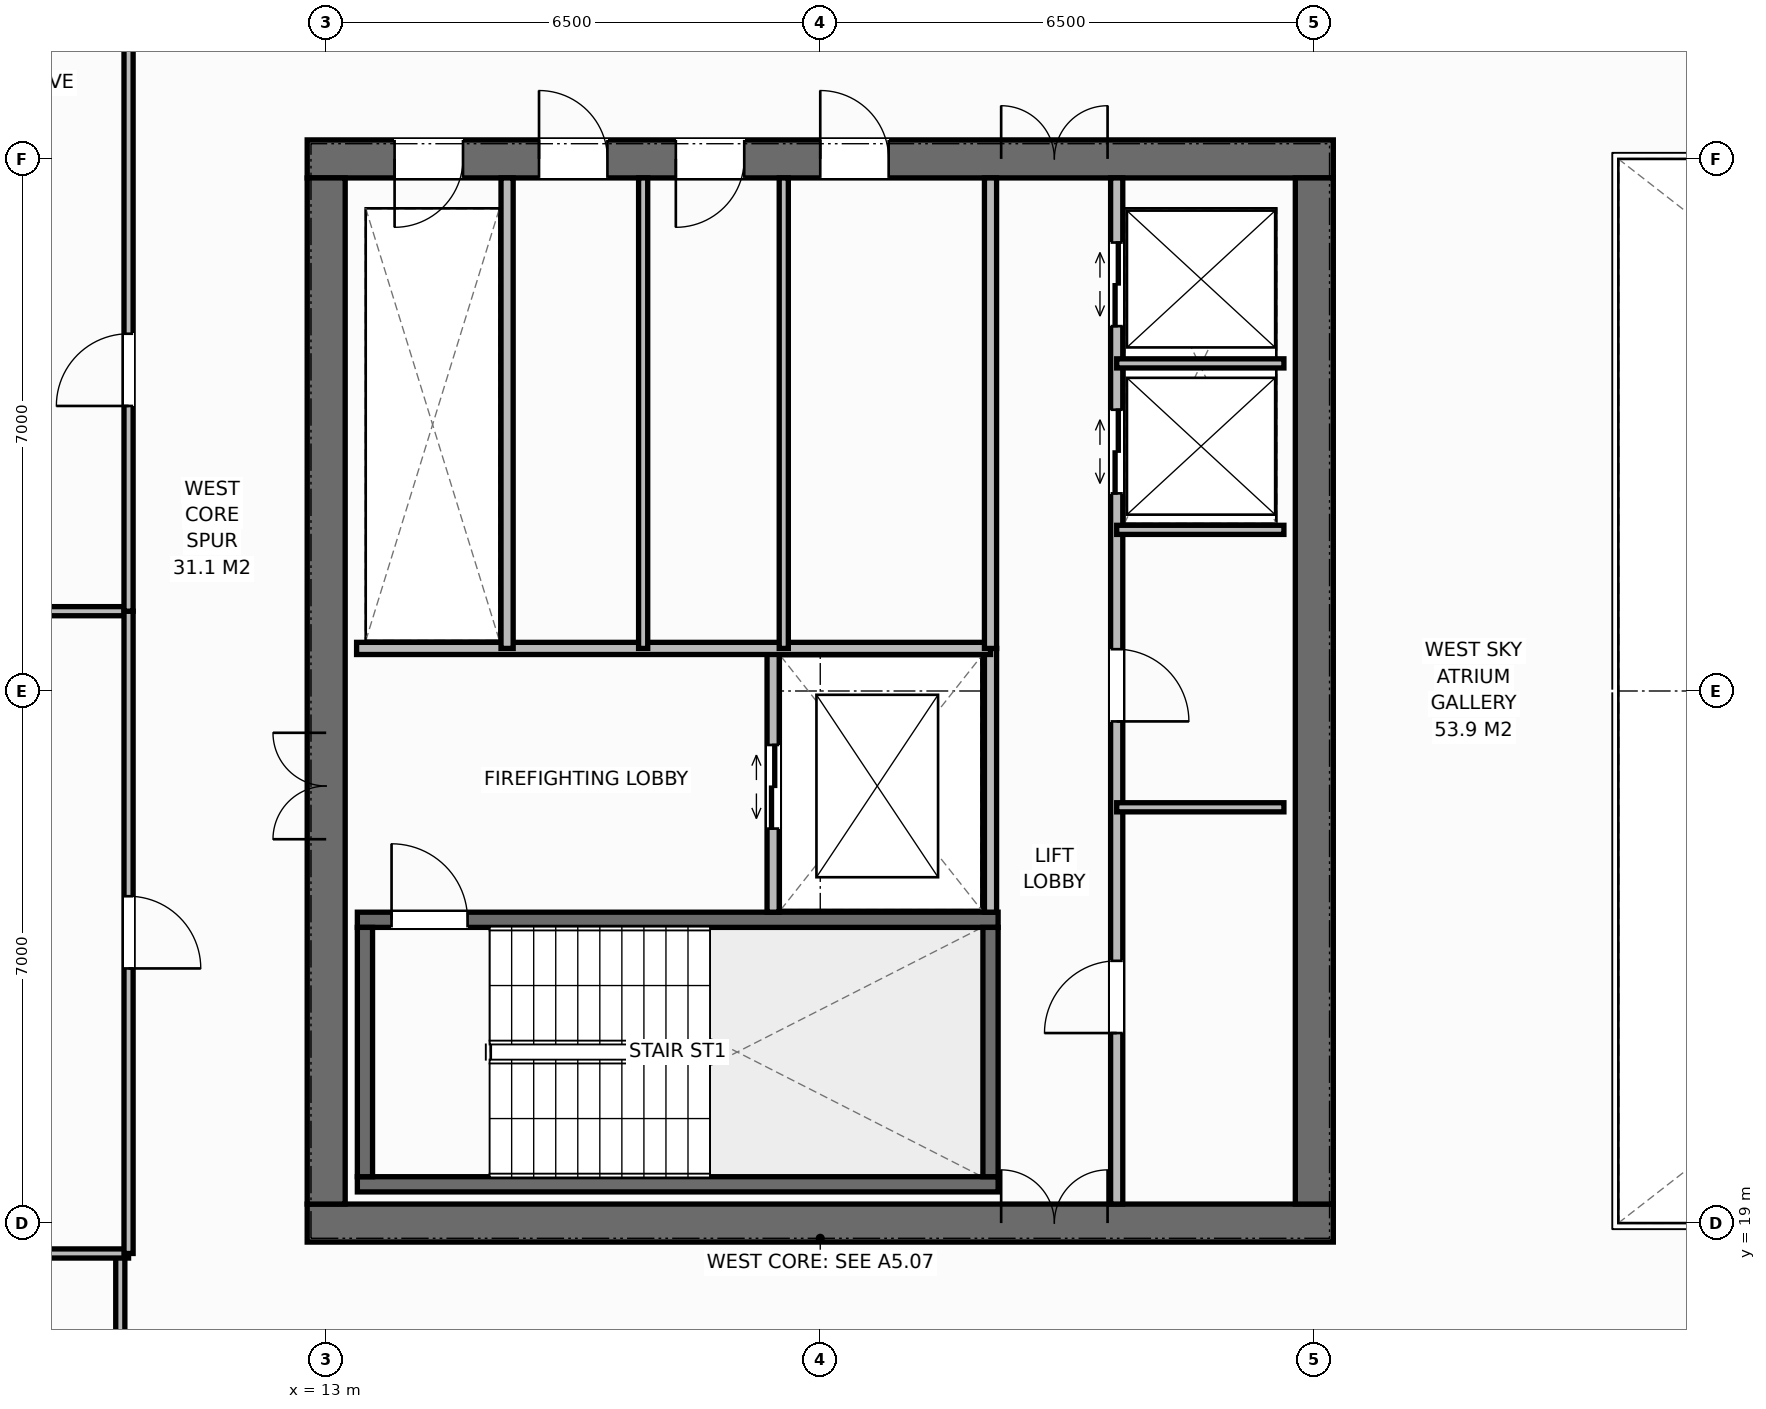
"""IFC4 building model, lengths in metres.
Left out: names, types, materials, properties, quantities, classifications, styles, units other than length and angle.
Written with IfcOpenShell. Run it as: python <this file> out.ifc"""

import sys

from ifc_helpers import new_model, si_unit, direction, frame, frame_2d, origin, place, context, subcontext, project, spatial, rectangle, extrude, element, fill, save


model = new_model("IFC4")
c1 = context("Model", 3, precision=1e-05, world=origin(), true_north=direction((0.0, 1.0)))
c2 = subcontext(c1, "Body", "Model", "MODEL_VIEW")
j1 = project(units=[si_unit("LENGTHUNIT", "METRE"), si_unit("PLANEANGLEUNIT", "RADIAN")], contexts=[c1])
p1 = place(None, origin())
s1 = spatial("IfcSite", under=j1, at=p1, CompositionType="ELEMENT")
p2 = place(p1, origin())
s2 = spatial("IfcBuilding", under=s1, at=p2, CompositionType="ELEMENT")
p3 = place(p2, frame((0.0, 0.0, 217.6)))
s3 = spatial("IfcBuildingStorey", under=s2, at=p3, CompositionType="ELEMENT", Elevation=217.6)
p4 = place(p3, frame((12.75, 19.0, 0.0), z_axis=(0.0, 0.0, 1.0), x_axis=(1.0, 0.0, 0.0)))
e1 = element("IfcWall", 1, at=p4, inside=s3, PredefinedType="SHEAR", context=c2, shape_type="SweptSolid", body=[
    extrude(rectangle(XDim=13.5, YDim=0.5, at=frame_2d((6.75, 0.0))), origin(), (0.0, 0.0, 1.0), 3.8),
])
p5 = place(p4, frame((9.13, 0.0, 0.0)))
e2 = element("IfcOpeningElement", 2, at=p5, cuts=e1, PredefinedType="OPENING", context=c2, shape_type="SweptSolid", body=[
    extrude(rectangle(XDim=1.4, YDim=2.2, at=frame_2d((0.7, 1.1))), frame((0.0, 0.26, 0.0), z_axis=(0.0, -1.0, 0.0), x_axis=(1.0, 0.0, 0.0)), (0.0, 0.0, 1.0), 0.52),
])
p6 = place(p3, frame((12.75, 33.0, 0.0), z_axis=(0.0, 0.0, 1.0), x_axis=(1.0, 0.0, 0.0)))
e3 = element("IfcWall", 3, at=p6, inside=s3, PredefinedType="SHEAR", context=c2, shape_type="SweptSolid", body=[
    extrude(rectangle(XDim=13.5, YDim=0.5, at=frame_2d((6.75, 0.0))), origin(), (0.0, 0.0, 1.0), 3.8),
])
p7 = place(p6, frame((1.15, 0.0, 0.0)))
e4 = element("IfcOpeningElement", 4, at=p7, cuts=e3, PredefinedType="OPENING", context=c2, shape_type="SweptSolid", body=[
    extrude(rectangle(XDim=0.9, YDim=2.15, at=frame_2d((0.45, 1.075))), frame((0.0, 0.26, 0.0), z_axis=(0.0, -1.0, 0.0), x_axis=(1.0, 0.0, 0.0)), (0.0, 0.0, 1.0), 0.52),
])
p8 = place(p6, frame((3.05, 0.0, 0.0)))
e5 = element("IfcOpeningElement", 5, at=p8, cuts=e3, PredefinedType="OPENING", context=c2, shape_type="SweptSolid", body=[
    extrude(rectangle(XDim=0.9, YDim=2.15, at=frame_2d((0.45, 1.075))), frame((0.0, 0.26, 0.0), z_axis=(0.0, -1.0, 0.0), x_axis=(1.0, 0.0, 0.0)), (0.0, 0.0, 1.0), 0.52),
])
p9 = place(p6, frame((4.85, 0.0, 0.0)))
e6 = element("IfcOpeningElement", 6, at=p9, cuts=e3, PredefinedType="OPENING", context=c2, shape_type="SweptSolid", body=[
    extrude(rectangle(XDim=0.9, YDim=2.15, at=frame_2d((0.45, 1.075))), frame((0.0, 0.26, 0.0), z_axis=(0.0, -1.0, 0.0), x_axis=(1.0, 0.0, 0.0)), (0.0, 0.0, 1.0), 0.52),
])
p10 = place(p6, frame((6.75, 0.0, 0.0)))
e7 = element("IfcOpeningElement", 7, at=p10, cuts=e3, PredefinedType="OPENING", context=c2, shape_type="SweptSolid", body=[
    extrude(rectangle(XDim=0.9, YDim=2.15, at=frame_2d((0.45, 1.075))), frame((0.0, 0.26, 0.0), z_axis=(0.0, -1.0, 0.0), x_axis=(1.0, 0.0, 0.0)), (0.0, 0.0, 1.0), 0.52),
])
p11 = place(p6, frame((9.13, 0.0, 0.0)))
e8 = element("IfcOpeningElement", 8, at=p11, cuts=e3, PredefinedType="OPENING", context=c2, shape_type="SweptSolid", body=[
    extrude(rectangle(XDim=1.4, YDim=2.2, at=frame_2d((0.7, 1.1))), frame((0.0, 0.26, 0.0), z_axis=(0.0, -1.0, 0.0), x_axis=(1.0, 0.0, 0.0)), (0.0, 0.0, 1.0), 0.52),
])
p12 = place(p3, frame((13.0, 19.25, 0.0), z_axis=(0.0, 0.0, 1.0), x_axis=(0.0, 1.0, 0.0)))
e9 = element("IfcWall", 9, at=p12, inside=s3, PredefinedType="SHEAR", context=c2, shape_type="SweptSolid", body=[
    extrude(rectangle(XDim=13.5, YDim=0.5, at=frame_2d((6.75, 0.0))), origin(), (0.0, 0.0, 1.0), 3.8),
])
p13 = place(p12, frame((4.8, 0.0, 0.0)))
e10 = element("IfcOpeningElement", 10, at=p13, cuts=e9, PredefinedType="OPENING", context=c2, shape_type="SweptSolid", body=[
    extrude(rectangle(XDim=1.4, YDim=2.2, at=frame_2d((0.7, 1.1))), frame((0.0, 0.26, 0.0), z_axis=(0.0, -1.0, 0.0), x_axis=(1.0, 0.0, 0.0)), (0.0, 0.0, 1.0), 0.52),
])
p14 = place(p3, frame((26.0, 19.25, 0.0), z_axis=(0.0, 0.0, 1.0), x_axis=(0.0, 1.0, 0.0)))
e11 = element("IfcWall", 11, at=p14, inside=s3, PredefinedType="SHEAR", context=c2, shape_type="SweptSolid", body=[
    extrude(rectangle(XDim=13.5, YDim=0.5, at=frame_2d((6.75, 0.0))), origin(), (0.0, 0.0, 1.0), 3.8),
])
p15 = place(p3, frame((13.41, 19.51, 0.0), z_axis=(0.0, 0.0, 1.0), x_axis=(1.0, 0.0, 0.0)))
e12 = element("IfcWall", 12, at=p15, inside=s3, PredefinedType="SHEAR", context=c2, shape_type="SweptSolid", body=[
    extrude(rectangle(XDim=8.43, YDim=0.2, at=frame_2d((4.215, 0.0))), origin(), (0.0, 0.0, 1.0), 3.8),
])
p16 = place(p3, frame((13.41, 22.99, 0.0), z_axis=(0.0, 0.0, 1.0), x_axis=(1.0, 0.0, 0.0)))
e13 = element("IfcWall", 13, at=p16, inside=s3, PredefinedType="SHEAR", context=c2, shape_type="SweptSolid", body=[
    extrude(rectangle(XDim=8.43, YDim=0.2, at=frame_2d((4.215, 0.0))), origin(), (0.0, 0.0, 1.0), 3.8),
])
p17 = place(p16, frame((0.45, 0.0, 0.0)))
e14 = element("IfcOpeningElement", 14, at=p17, cuts=e13, PredefinedType="OPENING", context=c2, shape_type="SweptSolid", body=[
    extrude(rectangle(XDim=1.0, YDim=2.15, at=frame_2d((0.5, 1.075))), frame((0.0, 0.11, 0.0), z_axis=(0.0, -1.0, 0.0), x_axis=(1.0, 0.0, 0.0)), (0.0, 0.0, 1.0), 0.22),
])
for number, where, z_axis, x_axis in (
    (15, (13.51, 19.61, 0.0), (0.0, 0.0, 1.0), (0.0, 1.0, 0.0)),
    (16, (21.74, 19.61, 0.0), (0.0, 0.0, 1.0), (0.0, 1.0, 0.0)),
):
    element("IfcWall", number, at=place(p3, frame(where, z_axis=z_axis, x_axis=x_axis)), inside=s3, PredefinedType="SHEAR", context=c2, shape_type="SweptSolid", body=[
        extrude(rectangle(XDim=3.28, YDim=0.2, at=frame_2d((1.64, 0.0))), origin(), (0.0, 0.0, 1.0), 3.8),
    ])
p18 = place(p3, frame((21.74, 23.09, 0.0), z_axis=(0.0, 0.0, 1.0), x_axis=(0.0, 1.0, 0.0)))
e17 = element("IfcWall", 17, at=p18, inside=s3, PredefinedType="STANDARD", context=c2, shape_type="SweptSolid", body=[
    extrude(rectangle(XDim=3.47, YDim=0.16, at=frame_2d((1.735, 0.0))), origin(), (0.0, 0.0, 1.0), 3.58),
])
p19 = place(p3, frame((18.88, 23.09, 0.0), z_axis=(0.0, 0.0, 1.0), x_axis=(0.0, 1.0, 0.0)))
e18 = element("IfcWall", 18, at=p19, inside=s3, PredefinedType="STANDARD", context=c2, shape_type="SweptSolid", body=[
    extrude(rectangle(XDim=3.47, YDim=0.16, at=frame_2d((1.735, 0.0))), origin(), (0.0, 0.0, 1.0), 3.58),
])
p20 = place(p19, frame((1.1, 0.0, 0.0)))
e19 = element("IfcOpeningElement", 19, at=p20, cuts=e18, PredefinedType="OPENING", context=c2, shape_type="SweptSolid", body=[
    extrude(rectangle(XDim=1.1, YDim=2.2, at=frame_2d((0.55, 1.1))), frame((0.0, 0.09, 0.0), z_axis=(0.0, -1.0, 0.0), x_axis=(1.0, 0.0, 0.0)), (0.0, 0.0, 1.0), 0.18),
])
p21 = place(p3, frame((13.4, 26.56, 0.0), z_axis=(0.0, 0.0, 1.0), x_axis=(1.0, 0.0, 0.0)))
e20 = element("IfcWall", 20, at=p21, inside=s3, PredefinedType="STANDARD", context=c2, shape_type="SweptSolid", body=[
    extrude(rectangle(XDim=8.34, YDim=0.16, at=frame_2d((4.17, 0.0))), origin(), (0.0, 0.0, 1.0), 3.58),
])
p22 = place(p3, frame((15.38, 26.56, 0.0), z_axis=(0.0, 0.0, 1.0), x_axis=(0.0, 1.0, 0.0)))
e21 = element("IfcWall", 21, at=p22, inside=s3, PredefinedType="STANDARD", context=c2, shape_type="SweptSolid", body=[
    extrude(rectangle(XDim=6.19, YDim=0.16, at=frame_2d((3.095, 0.0))), origin(), (0.0, 0.0, 1.0), 3.58),
])
for number, where, z_axis, x_axis in (
    (22, (17.17, 26.56, 0.0), (0.0, 0.0, 1.0), (0.0, 1.0, 0.0)),
    (23, (19.02, 26.56, 0.0), (0.0, 0.0, 1.0), (0.0, 1.0, 0.0)),
):
    element("IfcWall", number, at=place(p3, frame(where, z_axis=z_axis, x_axis=x_axis)), inside=s3, PredefinedType="PARTITIONING", context=c2, shape_type="SweptSolid", body=[
        extrude(rectangle(XDim=6.19, YDim=0.12, at=frame_2d((3.095, 0.0))), origin(), (0.0, 0.0, 1.0), 3.58),
    ])
p23 = place(p3, frame((21.74, 26.56, 0.0), z_axis=(0.0, 0.0, 1.0), x_axis=(0.0, 1.0, 0.0)))
e24 = element("IfcWall", 24, at=p23, inside=s3, PredefinedType="STANDARD", context=c2, shape_type="SweptSolid", body=[
    extrude(rectangle(XDim=6.19, YDim=0.16, at=frame_2d((3.095, 0.0))), origin(), (0.0, 0.0, 1.0), 3.58),
])
p24 = place(p3, frame((23.4, 19.25, 0.0), z_axis=(0.0, 0.0, 1.0), x_axis=(0.0, 1.0, 0.0)))
e25 = element("IfcWall", 25, at=p24, inside=s3, PredefinedType="STANDARD", context=c2, shape_type="SweptSolid", body=[
    extrude(rectangle(XDim=13.5, YDim=0.16, at=frame_2d((6.75, 0.0))), origin(), (0.0, 0.0, 1.0), 3.58),
])
p25 = place(p24, frame((2.25, 0.0, 0.0)))
e26 = element("IfcOpeningElement", 26, at=p25, cuts=e25, PredefinedType="OPENING", context=c2, shape_type="SweptSolid", body=[
    extrude(rectangle(XDim=0.95, YDim=2.15, at=frame_2d((0.475, 1.075))), frame((0.0, 0.09, 0.0), z_axis=(0.0, -1.0, 0.0), x_axis=(1.0, 0.0, 0.0)), (0.0, 0.0, 1.0), 0.18),
])
p26 = place(p24, frame((6.35, 0.0, 0.0)))
e27 = element("IfcOpeningElement", 27, at=p26, cuts=e25, PredefinedType="OPENING", context=c2, shape_type="SweptSolid", body=[
    extrude(rectangle(XDim=0.95, YDim=2.15, at=frame_2d((0.475, 1.075))), frame((0.0, 0.09, 0.0), z_axis=(0.0, -1.0, 0.0), x_axis=(1.0, 0.0, 0.0)), (0.0, 0.0, 1.0), 0.18),
])
p27 = place(p24, frame((9.35, 0.0, 0.0)))
e28 = element("IfcOpeningElement", 28, at=p27, cuts=e25, PredefinedType="OPENING", context=c2, shape_type="SweptSolid", body=[
    extrude(rectangle(XDim=1.1, YDim=2.2, at=frame_2d((0.55, 1.1))), frame((0.0, 0.09, 0.0), z_axis=(0.0, -1.0, 0.0), x_axis=(1.0, 0.0, 0.0)), (0.0, 0.0, 1.0), 0.18),
])
p28 = place(p24, frame((11.55, 0.0, 0.0)))
e29 = element("IfcOpeningElement", 29, at=p28, cuts=e25, PredefinedType="OPENING", context=c2, shape_type="SweptSolid", body=[
    extrude(rectangle(XDim=1.1, YDim=2.2, at=frame_2d((0.55, 1.1))), frame((0.0, 0.09, 0.0), z_axis=(0.0, -1.0, 0.0), x_axis=(1.0, 0.0, 0.0)), (0.0, 0.0, 1.0), 0.18),
])
for number, where, z_axis, x_axis in (
    (30, (23.4, 24.47, 0.0), (0.0, 0.0, 1.0), (1.0, 0.0, 0.0)),
    (31, (23.4, 28.12, 0.0), (0.0, 0.0, 1.0), (1.0, 0.0, 0.0)),
    (32, (23.4, 30.31, 0.0), (0.0, 0.0, 1.0), (1.0, 0.0, 0.0)),
):
    element("IfcWall", number, at=place(p3, frame(where, z_axis=z_axis, x_axis=x_axis)), inside=s3, PredefinedType="PARTITIONING", context=c2, shape_type="SweptSolid", body=[
        extrude(rectangle(XDim=2.2, YDim=0.12, at=frame_2d((1.1, 0.0))), origin(), (0.0, 0.0, 1.0), 3.58),
    ])
p29 = place(p3, frame((10.291, 16.5, 0.0), z_axis=(0.0, 0.0, 1.0), x_axis=(0.0, 1.0, 0.0)))
e33 = element("IfcWall", 33, at=p29, inside=s3, PredefinedType="PARTITIONING", context=c2, shape_type="SweptSolid", body=[
    extrude(rectangle(XDim=2.1, YDim=0.12, at=frame_2d((1.05, 0.0))), origin(), (0.0, 0.0, 1.0), 3.58),
])
for number, where, z_axis, x_axis in (
    (34, (5.82, 18.6, 0.0), (0.0, 0.0, 1.0), (1.0, 0.0, 0.0)),
    (35, (5.82, 27.05, 0.0), (0.0, 0.0, 1.0), (1.0, 0.0, 0.0)),
):
    element("IfcWall", number, at=place(p3, frame(where, z_axis=z_axis, x_axis=x_axis)), inside=s3, PredefinedType="PARTITIONING", context=c2, shape_type="SweptSolid", body=[
        extrude(rectangle(XDim=4.58, YDim=0.12, at=frame_2d((2.29, 0.0))), origin(), (0.0, 0.0, 1.0), 3.58),
    ])
p30 = place(p3, frame((10.4, 18.6, 0.0), z_axis=(0.0, 0.0, 1.0), x_axis=(0.0, 1.0, 0.0)))
e36 = element("IfcWall", 36, at=p30, inside=s3, PredefinedType="PARTITIONING", context=c2, shape_type="SweptSolid", body=[
    extrude(rectangle(XDim=8.45, YDim=0.12, at=frame_2d((4.225, 0.0))), origin(), (0.0, 0.0, 1.0), 3.58),
])
p31 = place(p30, frame((3.75, 0.0, 0.0)))
e37 = element("IfcOpeningElement", 37, at=p31, cuts=e36, PredefinedType="OPENING", context=c2, shape_type="SweptSolid", body=[
    extrude(rectangle(XDim=0.95, YDim=2.15, at=frame_2d((0.475, 1.075))), frame((0.0, 0.07, 0.0), z_axis=(0.0, -1.0, 0.0), x_axis=(1.0, 0.0, 0.0)), (0.0, 0.0, 1.0), 0.14),
])
p32 = place(p3, frame((10.4, 27.05, 0.0), z_axis=(0.0, 0.0, 1.0), x_axis=(0.0, 1.0, 0.0)))
e38 = element("IfcWall", 38, at=p32, inside=s3, PredefinedType="PARTITIONING", context=c2, shape_type="SweptSolid", body=[
    extrude(rectangle(XDim=8.45, YDim=0.12, at=frame_2d((4.225, 0.0))), origin(), (0.0, 0.0, 1.0), 3.58),
])
p33 = place(p32, frame((2.7, 0.0, 0.0)))
e39 = element("IfcOpeningElement", 39, at=p33, cuts=e38, PredefinedType="OPENING", context=c2, shape_type="SweptSolid", body=[
    extrude(rectangle(XDim=0.95, YDim=2.15, at=frame_2d((0.475, 1.075))), frame((0.0, 0.07, 0.0), z_axis=(0.0, -1.0, 0.0), x_axis=(1.0, 0.0, 0.0)), (0.0, 0.0, 1.0), 0.14),
])
p34 = place(p17, origin())
e40 = element("IfcDoor", 40, at=p34, inside=s3, OperationType="SINGLE_SWING_LEFT", PredefinedType="DOOR", context=c2, shape_type="SweptSolid", body=[
    extrude(rectangle(XDim=1.0, YDim=2.15, at=frame_2d((0.5, 1.075))), frame((0.0, 0.025, 0.0), z_axis=(0.0, -1.0, 0.0), x_axis=(1.0, 0.0, 0.0)), (0.0, 0.0, 1.0), 0.05),
])
fill(e14, e40)
p35 = place(p13, origin())
e41 = element("IfcDoor", 41, at=p35, inside=s3, OperationType="DOUBLE_DOOR_SINGLE_SWING", PredefinedType="DOOR", context=c2, shape_type="SweptSolid", body=[
    extrude(rectangle(XDim=1.4, YDim=2.2, at=frame_2d((0.7, 1.1))), frame((0.0, 0.025, 0.0), z_axis=(0.0, -1.0, 0.0), x_axis=(1.0, 0.0, 0.0)), (0.0, 0.0, 1.0), 0.05),
])
fill(e10, e41)
p36 = place(p20, origin())
e42 = element("IfcDoor", 42, at=p36, inside=s3, OperationType="DOUBLE_DOOR_SLIDING", PredefinedType="DOOR", context=c2, shape_type="SweptSolid", body=[
    extrude(rectangle(XDim=1.1, YDim=2.2, at=frame_2d((0.55, 1.1))), frame((0.0, 0.025, 0.0), z_axis=(0.0, -1.0, 0.0), x_axis=(1.0, 0.0, 0.0)), (0.0, 0.0, 1.0), 0.05),
])
fill(e19, e42)
p37 = place(p7, origin())
e43 = element("IfcDoor", 43, at=p37, inside=s3, OperationType="SINGLE_SWING_RIGHT", PredefinedType="DOOR", context=c2, shape_type="SweptSolid", body=[
    extrude(rectangle(XDim=0.9, YDim=2.15, at=frame_2d((0.45, 1.075))), frame((0.0, -0.025, 0.0), z_axis=(0.0, -1.0, 0.0), x_axis=(1.0, 0.0, 0.0)), (0.0, 0.0, 1.0), 0.05),
])
fill(e4, e43)
p38 = place(p8, origin())
e44 = element("IfcDoor", 44, at=p38, inside=s3, OperationType="SINGLE_SWING_LEFT", PredefinedType="DOOR", context=c2, shape_type="SweptSolid", body=[
    extrude(rectangle(XDim=0.9, YDim=2.15, at=frame_2d((0.45, 1.075))), frame((0.0, -0.025, 0.0), z_axis=(0.0, -1.0, 0.0), x_axis=(1.0, 0.0, 0.0)), (0.0, 0.0, 1.0), 0.05),
])
fill(e5, e44)
p39 = place(p9, origin())
e45 = element("IfcDoor", 45, at=p39, inside=s3, OperationType="SINGLE_SWING_RIGHT", PredefinedType="DOOR", context=c2, shape_type="SweptSolid", body=[
    extrude(rectangle(XDim=0.9, YDim=2.15, at=frame_2d((0.45, 1.075))), frame((0.0, -0.025, 0.0), z_axis=(0.0, -1.0, 0.0), x_axis=(1.0, 0.0, 0.0)), (0.0, 0.0, 1.0), 0.05),
])
fill(e6, e45)
p40 = place(p10, origin())
e46 = element("IfcDoor", 46, at=p40, inside=s3, OperationType="SINGLE_SWING_LEFT", PredefinedType="DOOR", context=c2, shape_type="SweptSolid", body=[
    extrude(rectangle(XDim=0.9, YDim=2.15, at=frame_2d((0.45, 1.075))), frame((0.0, -0.025, 0.0), z_axis=(0.0, -1.0, 0.0), x_axis=(1.0, 0.0, 0.0)), (0.0, 0.0, 1.0), 0.05),
])
fill(e7, e46)
p41 = place(p5, origin())
e47 = element("IfcDoor", 47, at=p41, inside=s3, OperationType="DOUBLE_DOOR_SINGLE_SWING", PredefinedType="DOOR", context=c2, shape_type="SweptSolid", body=[
    extrude(rectangle(XDim=1.4, YDim=2.2, at=frame_2d((0.7, 1.1))), frame((0.0, 0.075, 0.0), z_axis=(0.0, -1.0, 0.0), x_axis=(1.0, 0.0, 0.0)), (0.0, 0.0, 1.0), 0.05),
])
fill(e2, e47)
p42 = place(p11, origin())
e48 = element("IfcDoor", 48, at=p42, inside=s3, OperationType="DOUBLE_DOOR_SINGLE_SWING", PredefinedType="DOOR", context=c2, shape_type="SweptSolid", body=[
    extrude(rectangle(XDim=1.4, YDim=2.2, at=frame_2d((0.7, 1.1))), frame((0.0, -0.025, 0.0), z_axis=(0.0, -1.0, 0.0), x_axis=(1.0, 0.0, 0.0)), (0.0, 0.0, 1.0), 0.05),
])
fill(e8, e48)
p43 = place(p25, origin())
e49 = element("IfcDoor", 49, at=p43, inside=s3, OperationType="SINGLE_SWING_LEFT", PredefinedType="DOOR", context=c2, shape_type="SweptSolid", body=[
    extrude(rectangle(XDim=0.95, YDim=2.15, at=frame_2d((0.475, 1.075))), frame((0.0, 0.025, 0.0), z_axis=(0.0, -1.0, 0.0), x_axis=(1.0, 0.0, 0.0)), (0.0, 0.0, 1.0), 0.05),
])
fill(e26, e49)
p44 = place(p26, origin())
e50 = element("IfcDoor", 50, at=p44, inside=s3, OperationType="SINGLE_SWING_RIGHT", PredefinedType="DOOR", context=c2, shape_type="SweptSolid", body=[
    extrude(rectangle(XDim=0.95, YDim=2.15, at=frame_2d((0.475, 1.075))), frame((0.0, 0.025, 0.0), z_axis=(0.0, -1.0, 0.0), x_axis=(1.0, 0.0, 0.0)), (0.0, 0.0, 1.0), 0.05),
])
fill(e27, e50)
p45 = place(p27, origin())
e51 = element("IfcDoor", 51, at=p45, inside=s3, OperationType="DOUBLE_DOOR_SLIDING", PredefinedType="DOOR", context=c2, shape_type="SweptSolid", body=[
    extrude(rectangle(XDim=1.1, YDim=2.2, at=frame_2d((0.55, 1.1))), frame((0.0, 0.025, 0.0), z_axis=(0.0, -1.0, 0.0), x_axis=(1.0, 0.0, 0.0)), (0.0, 0.0, 1.0), 0.05),
])
fill(e28, e51)
p46 = place(p28, origin())
e52 = element("IfcDoor", 52, at=p46, inside=s3, OperationType="DOUBLE_DOOR_SLIDING", PredefinedType="DOOR", context=c2, shape_type="SweptSolid", body=[
    extrude(rectangle(XDim=1.1, YDim=2.2, at=frame_2d((0.55, 1.1))), frame((0.0, 0.025, 0.0), z_axis=(0.0, -1.0, 0.0), x_axis=(1.0, 0.0, 0.0)), (0.0, 0.0, 1.0), 0.05),
])
fill(e29, e52)
p47 = place(p31, origin())
e53 = element("IfcDoor", 53, at=p47, inside=s3, OperationType="SINGLE_SWING_RIGHT", PredefinedType="DOOR", context=c2, shape_type="SweptSolid", body=[
    extrude(rectangle(XDim=0.95, YDim=2.15, at=frame_2d((0.475, 1.075))), frame((0.0, 0.025, 0.0), z_axis=(0.0, -1.0, 0.0), x_axis=(1.0, 0.0, 0.0)), (0.0, 0.0, 1.0), 0.05),
])
fill(e37, e53)
p48 = place(p33, origin())
e54 = element("IfcDoor", 54, at=p48, inside=s3, OperationType="SINGLE_SWING_LEFT", PredefinedType="DOOR", context=c2, shape_type="SweptSolid", body=[
    extrude(rectangle(XDim=0.95, YDim=2.15, at=frame_2d((0.475, 1.075))), frame((0.0, 0.025, 0.0), z_axis=(0.0, -1.0, 0.0), x_axis=(1.0, 0.0, 0.0)), (0.0, 0.0, 1.0), 0.05),
])
fill(e39, e54)
save(model, sys.argv[1])
